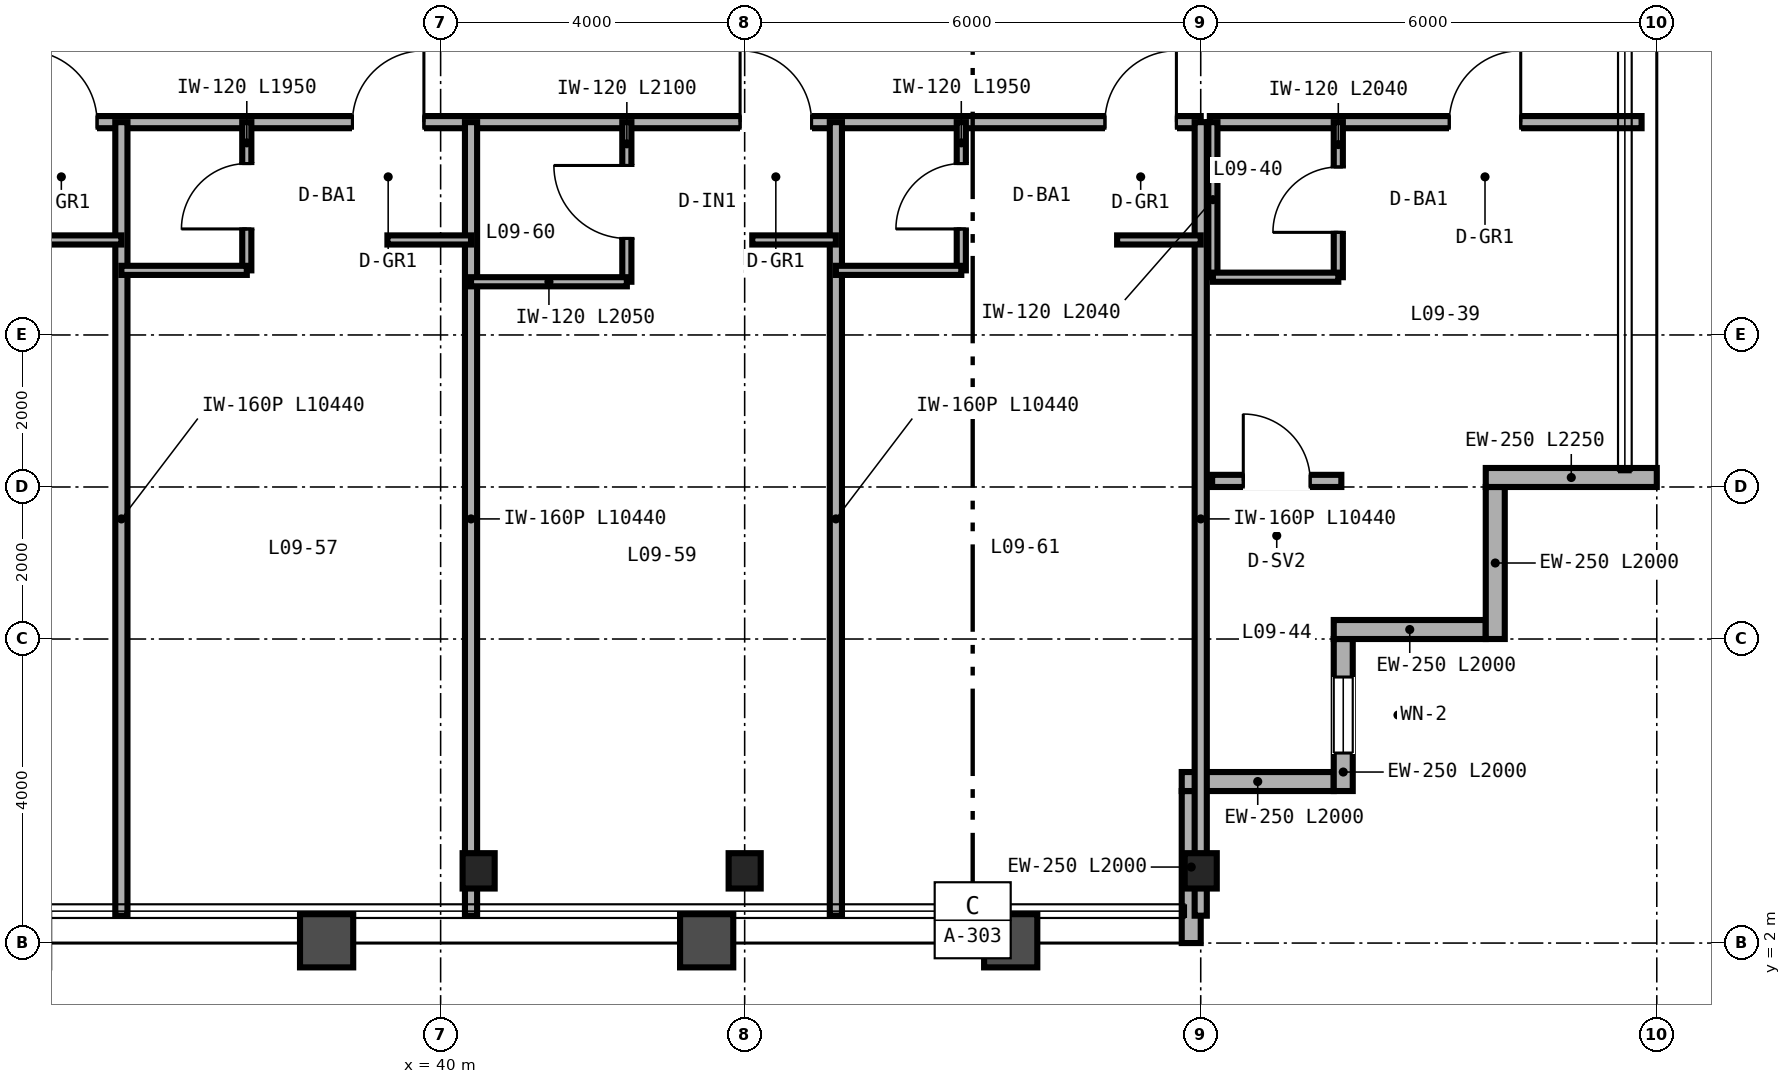
"""IFC4 building model, lengths in metres.
Left out: names, types, materials, properties, quantities, classifications, styles, units other than length and angle.
Written with IfcOpenShell. Run it as: python <this file> out.ifc"""

import sys

from ifc_helpers import new_model, si_unit, direction, frame, frame_2d, origin, origin_2d, place, context, subcontext, project, spatial, rectangle, i_section, extrude, source, transform, mapped, element, fill, save


model = new_model("IFC4")
c1 = context("Model", 3, precision=1e-05, world=origin(), true_north=direction((0.0, 1.0)))
c2 = subcontext(c1, "Body", "Model", "MODEL_VIEW")
j1 = project(units=[si_unit("LENGTHUNIT", "METRE"), si_unit("PLANEANGLEUNIT", "RADIAN")], contexts=[c1])
p1 = place(None, origin())
s1 = spatial("IfcSite", under=j1, at=p1, CompositionType="ELEMENT")
p2 = place(p1, origin())
s2 = spatial("IfcBuilding", under=s1, at=p2, CompositionType="ELEMENT")
p3 = place(p2, frame((0.0, 0.0, 42.0)))
s3 = spatial("IfcBuildingStorey", under=s2, at=p3, CompositionType="ELEMENT", Elevation=42.0)
m1 = source(origin(), c2, "Body", "SweptSolid", [
    extrude(i_section(OverallWidth=0.422, OverallDepth=0.465, WebThickness=0.045, FlangeThickness=0.073, FilletRadius=0.025, at=origin_2d()), origin(), (0.0, 0.0, 1.0), 3.35),
])
for number, where, z_axis, x_axis in (
    (1, (40.5, 2.95, 0.0), (0.0, 0.0, 1.0), (1.0, 0.0, 0.0)),
    (2, (44.0, 2.95, 0.0), (0.0, 0.0, 1.0), (1.0, 0.0, 0.0)),
    (3, (50.0, 2.95, 0.0), (0.0, 0.0, 1.0), (1.0, 0.0, 0.0)),
):
    element("IfcColumn", number, at=place(p3, frame(where, z_axis=z_axis, x_axis=x_axis)), inside=s3, PredefinedType="COLUMN", context=c2, shape_type="MappedRepresentation", body=[
        mapped(m1, transform((0.0, 0.0, 0.0), scale=1.0)),
    ])
p4 = place(p3, frame((49.875, 2.0, 0.0), z_axis=(0.0, 0.0, 1.0), x_axis=(0.0, 1.0, 0.0)))
e4 = element("IfcWall", 4, at=p4, inside=s3, PredefinedType="SOLIDWALL", context=c2, shape_type="SweptSolid", body=[
    extrude(rectangle(XDim=2.0, YDim=0.25, at=frame_2d((1.0, 0.0))), origin(), (0.0, 0.0, 1.0), 2.657),
])
p5 = place(p3, frame((49.75, 4.125, 0.0), z_axis=(0.0, 0.0, 1.0), x_axis=(1.0, 0.0, 0.0)))
e5 = element("IfcWall", 5, at=p5, inside=s3, PredefinedType="SOLIDWALL", context=c2, shape_type="SweptSolid", body=[
    extrude(rectangle(XDim=2.0, YDim=0.25, at=frame_2d((1.0, 0.0))), origin(), (0.0, 0.0, 1.0), 3.35),
])
p6 = place(p3, frame((51.875, 4.0, 0.0), z_axis=(0.0, 0.0, 1.0), x_axis=(0.0, 1.0, 0.0)))
e6 = element("IfcWall", 6, at=p6, inside=s3, PredefinedType="SOLIDWALL", context=c2, shape_type="SweptSolid", body=[
    extrude(rectangle(XDim=2.0, YDim=0.25, at=frame_2d((1.0, 0.0))), origin(), (0.0, 0.0, 1.0), 3.35),
])
p7 = place(p6, frame((0.5, 0.0, 0.85)))
e7 = element("IfcOpeningElement", 7, at=p7, cuts=e6, PredefinedType="OPENING", context=c2, shape_type="SweptSolid", body=[
    extrude(rectangle(XDim=1.0, YDim=1.9, at=frame_2d((0.5, 0.95))), frame((0.0, 0.135, 0.0), z_axis=(0.0, -1.0, 0.0), x_axis=(1.0, 0.0, 0.0)), (0.0, 0.0, 1.0), 0.27),
])
for number, where, z_axis, x_axis in (
    (8, (51.75, 6.125, 0.0), (0.0, 0.0, 1.0), (1.0, 0.0, 0.0)),
    (9, (53.875, 6.0, 0.0), (0.0, 0.0, 1.0), (0.0, 1.0, 0.0)),
):
    element("IfcWall", number, at=place(p3, frame(where, z_axis=z_axis, x_axis=x_axis)), inside=s3, PredefinedType="SOLIDWALL", context=c2, shape_type="SweptSolid", body=[
        extrude(rectangle(XDim=2.0, YDim=0.25, at=frame_2d((1.0, 0.0))), origin(), (0.0, 0.0, 1.0), 3.35),
    ])
p8 = place(p3, frame((53.75, 8.125, 0.0), z_axis=(0.0, 0.0, 1.0), x_axis=(1.0, 0.0, 0.0)))
e10 = element("IfcWall", 10, at=p8, inside=s3, PredefinedType="SOLIDWALL", context=c2, shape_type="SweptSolid", body=[
    extrude(rectangle(XDim=2.25, YDim=0.25, at=frame_2d((1.125, 0.0))), origin(), (0.0, 0.0, 1.0), 3.35),
])
p9 = place(p3, frame((50.12, 12.8, 0.0), z_axis=(0.0, 0.0, 1.0), x_axis=(1.0, 0.0, 0.0)))
e11 = element("IfcWall", 11, at=p9, inside=s3, PredefinedType="PARTITIONING", context=c2, shape_type="SweptSolid", body=[
    extrude(rectangle(XDim=5.68, YDim=0.16, at=frame_2d((2.84, 0.0))), origin(), (0.0, 0.0, 1.0), 3.35),
])
p10 = place(p9, frame((3.15, 0.0, 0.0)))
e12 = element("IfcOpeningElement", 12, at=p10, cuts=e11, PredefinedType="OPENING", context=c2, shape_type="SweptSolid", body=[
    extrude(rectangle(XDim=0.94, YDim=2.15, at=frame_2d((0.47, 1.075))), frame((0.0, 0.09, 0.0), z_axis=(0.0, -1.0, 0.0), x_axis=(1.0, 0.0, 0.0)), (0.0, 0.0, 1.0), 0.18),
])
p11 = place(p3, frame((51.81, 10.76, 0.0), z_axis=(0.0, 0.0, 1.0), x_axis=(0.0, 1.0, 0.0)))
e13 = element("IfcWall", 13, at=p11, inside=s3, PredefinedType="PARTITIONING", context=c2, shape_type="SweptSolid", body=[
    extrude(rectangle(XDim=2.04, YDim=0.12, at=frame_2d((1.02, 0.0))), origin(), (0.0, 0.0, 1.0), 3.35),
])
p12 = place(p11, frame((0.59, 0.0, 0.0)))
e14 = element("IfcOpeningElement", 14, at=p12, cuts=e13, PredefinedType="OPENING", context=c2, shape_type="SweptSolid", body=[
    extrude(rectangle(XDim=0.86, YDim=2.1, at=frame_2d((0.43, 1.05))), frame((0.0, 0.07, 0.0), z_axis=(0.0, -1.0, 0.0), x_axis=(1.0, 0.0, 0.0)), (0.0, 0.0, 1.0), 0.14),
])
p13 = place(p3, frame((50.16, 10.76, 0.0), z_axis=(0.0, 0.0, 1.0), x_axis=(0.0, 1.0, 0.0)))
e15 = element("IfcWall", 15, at=p13, inside=s3, PredefinedType="PARTITIONING", context=c2, shape_type="SweptSolid", body=[
    extrude(rectangle(XDim=2.04, YDim=0.12, at=frame_2d((1.02, 0.0))), origin(), (0.0, 0.0, 1.0), 3.35),
])
p14 = place(p3, frame((50.16, 10.76, 0.0), z_axis=(0.0, 0.0, 1.0), x_axis=(1.0, 0.0, 0.0)))
e16 = element("IfcWall", 16, at=p14, inside=s3, PredefinedType="PARTITIONING", context=c2, shape_type="SweptSolid", body=[
    extrude(rectangle(XDim=1.65, YDim=0.12, at=frame_2d((0.825, 0.0))), origin(), (0.0, 0.0, 1.0), 3.35),
])
p15 = place(p3, frame((50.15, 8.08, 0.0), z_axis=(0.0, 0.0, 1.0), x_axis=(1.0, 0.0, 0.0)))
e17 = element("IfcWall", 17, at=p15, inside=s3, PredefinedType="PARTITIONING", context=c2, shape_type="SweptSolid", body=[
    extrude(rectangle(XDim=1.7, YDim=0.16, at=frame_2d((0.85, 0.0))), origin(), (0.0, 0.0, 1.0), 3.35),
])
p16 = place(p15, frame((0.41, 0.0, 0.0)))
e18 = element("IfcOpeningElement", 18, at=p16, cuts=e17, PredefinedType="OPENING", context=c2, shape_type="SweptSolid", body=[
    extrude(rectangle(XDim=0.88, YDim=2.15, at=frame_2d((0.44, 1.075))), frame((0.0, 0.09, 0.0), z_axis=(0.0, -1.0, 0.0), x_axis=(1.0, 0.0, 0.0)), (0.0, 0.0, 1.0), 0.18),
])
p17 = place(p3, frame((14.0, 12.8, 0.0), z_axis=(0.0, 0.0, 1.0), x_axis=(1.0, 0.0, 0.0)))
e19 = element("IfcWall", 19, at=p17, inside=s3, PredefinedType="PARTITIONING", context=c2, shape_type="SweptSolid", body=[
    extrude(rectangle(XDim=36.0, YDim=0.16, at=frame_2d((18.0, 0.0))), origin(), (0.0, 0.0, 1.0), 2.571),
])
p18 = place(p17, frame((2.94, 0.0, 0.0)))
e20 = element("IfcOpeningElement", 20, at=p18, cuts=e19, PredefinedType="OPENING", context=c2, shape_type="SweptSolid", body=[
    extrude(rectangle(XDim=0.94, YDim=2.15, at=frame_2d((0.47, 1.075))), frame((0.0, 0.09, 0.0), z_axis=(0.0, -1.0, 0.0), x_axis=(1.0, 0.0, 0.0)), (0.0, 0.0, 1.0), 0.18),
])
p19 = place(p17, frame((7.14, 0.0, 0.0)))
e21 = element("IfcOpeningElement", 21, at=p19, cuts=e19, PredefinedType="OPENING", context=c2, shape_type="SweptSolid", body=[
    extrude(rectangle(XDim=0.94, YDim=2.15, at=frame_2d((0.47, 1.075))), frame((0.0, 0.09, 0.0), z_axis=(0.0, -1.0, 0.0), x_axis=(1.0, 0.0, 0.0)), (0.0, 0.0, 1.0), 0.18),
])
p20 = place(p17, frame((11.54, 0.0, 0.0)))
e22 = element("IfcOpeningElement", 22, at=p20, cuts=e19, PredefinedType="OPENING", context=c2, shape_type="SweptSolid", body=[
    extrude(rectangle(XDim=0.94, YDim=2.15, at=frame_2d((0.47, 1.075))), frame((0.0, 0.09, 0.0), z_axis=(0.0, -1.0, 0.0), x_axis=(1.0, 0.0, 0.0)), (0.0, 0.0, 1.0), 0.18),
])
p21 = place(p17, frame((15.94, 0.0, 0.0)))
e23 = element("IfcOpeningElement", 23, at=p21, cuts=e19, PredefinedType="OPENING", context=c2, shape_type="SweptSolid", body=[
    extrude(rectangle(XDim=0.94, YDim=2.15, at=frame_2d((0.47, 1.075))), frame((0.0, 0.09, 0.0), z_axis=(0.0, -1.0, 0.0), x_axis=(1.0, 0.0, 0.0)), (0.0, 0.0, 1.0), 0.18),
])
p22 = place(p17, frame((20.54, 0.0, 0.0)))
e24 = element("IfcOpeningElement", 24, at=p22, cuts=e19, PredefinedType="OPENING", context=c2, shape_type="SweptSolid", body=[
    extrude(rectangle(XDim=0.94, YDim=2.15, at=frame_2d((0.47, 1.075))), frame((0.0, 0.09, 0.0), z_axis=(0.0, -1.0, 0.0), x_axis=(1.0, 0.0, 0.0)), (0.0, 0.0, 1.0), 0.18),
])
p23 = place(p17, frame((24.84, 0.0, 0.0)))
e25 = element("IfcOpeningElement", 25, at=p23, cuts=e19, PredefinedType="OPENING", context=c2, shape_type="SweptSolid", body=[
    extrude(rectangle(XDim=0.94, YDim=2.15, at=frame_2d((0.47, 1.075))), frame((0.0, 0.09, 0.0), z_axis=(0.0, -1.0, 0.0), x_axis=(1.0, 0.0, 0.0)), (0.0, 0.0, 1.0), 0.18),
])
p24 = place(p17, frame((29.94, 0.0, 0.0)))
e26 = element("IfcOpeningElement", 26, at=p24, cuts=e19, PredefinedType="OPENING", context=c2, shape_type="SweptSolid", body=[
    extrude(rectangle(XDim=0.94, YDim=2.15, at=frame_2d((0.47, 1.075))), frame((0.0, 0.09, 0.0), z_axis=(0.0, -1.0, 0.0), x_axis=(1.0, 0.0, 0.0)), (0.0, 0.0, 1.0), 0.18),
])
p25 = place(p17, frame((34.74, 0.0, 0.0)))
e27 = element("IfcOpeningElement", 27, at=p25, cuts=e19, PredefinedType="OPENING", context=c2, shape_type="SweptSolid", body=[
    extrude(rectangle(XDim=0.94, YDim=2.15, at=frame_2d((0.47, 1.075))), frame((0.0, 0.09, 0.0), z_axis=(0.0, -1.0, 0.0), x_axis=(1.0, 0.0, 0.0)), (0.0, 0.0, 1.0), 0.18),
])
p26 = place(p3, frame((50.0, 2.36, 0.0), z_axis=(0.0, 0.0, 1.0), x_axis=(0.0, 1.0, 0.0)))
e28 = element("IfcWall", 28, at=p26, inside=s3, PredefinedType="PARTITIONING", context=c2, shape_type="SweptSolid", body=[
    extrude(rectangle(XDim=10.44, YDim=0.16, at=frame_2d((5.22, 0.0))), origin(), (0.0, 0.0, 1.0), 2.657),
])
p27 = place(p3, frame((35.8, 2.36, 0.0), z_axis=(0.0, 0.0, 1.0), x_axis=(0.0, 1.0, 0.0)))
e29 = element("IfcWall", 29, at=p27, inside=s3, PredefinedType="PARTITIONING", context=c2, shape_type="SweptSolid", body=[
    extrude(rectangle(XDim=10.44, YDim=0.16, at=frame_2d((5.22, 0.0))), origin(), (0.0, 0.0, 1.0), 2.423),
])
p28 = place(p3, frame((34.7, 11.25, 0.0), z_axis=(0.0, 0.0, 1.0), x_axis=(1.0, 0.0, 0.0)))
e30 = element("IfcWall", 30, at=p28, inside=s3, PredefinedType="PARTITIONING", context=c2, shape_type="SweptSolid", body=[
    extrude(rectangle(XDim=1.1, YDim=0.12, at=frame_2d((0.55, 0.0))), origin(), (0.0, 0.0, 1.0), 3.35),
])
p29 = place(p3, frame((40.4, 2.36, 0.0), z_axis=(0.0, 0.0, 1.0), x_axis=(0.0, 1.0, 0.0)))
e31 = element("IfcWall", 31, at=p29, inside=s3, PredefinedType="PARTITIONING", context=c2, shape_type="SweptSolid", body=[
    extrude(rectangle(XDim=10.44, YDim=0.16, at=frame_2d((5.22, 0.0))), origin(), (0.0, 0.0, 1.0), 2.423),
])
p30 = place(p3, frame((37.45, 10.85, 0.0), z_axis=(0.0, 0.0, 1.0), x_axis=(0.0, 1.0, 0.0)))
e32 = element("IfcWall", 32, at=p30, inside=s3, PredefinedType="PARTITIONING", context=c2, shape_type="SweptSolid", body=[
    extrude(rectangle(XDim=1.95, YDim=0.12, at=frame_2d((0.975, 0.0))), origin(), (0.0, 0.0, 1.0), 3.35),
])
p31 = place(p30, frame((0.545, 0.0, 0.0)))
e33 = element("IfcOpeningElement", 33, at=p31, cuts=e32, PredefinedType="OPENING", context=c2, shape_type="SweptSolid", body=[
    extrude(rectangle(XDim=0.86, YDim=2.1, at=frame_2d((0.43, 1.05))), frame((0.0, 0.07, 0.0), z_axis=(0.0, -1.0, 0.0), x_axis=(1.0, 0.0, 0.0)), (0.0, 0.0, 1.0), 0.14),
])
p32 = place(p3, frame((35.8, 10.85, 0.0), z_axis=(0.0, 0.0, 1.0), x_axis=(1.0, 0.0, 0.0)))
e34 = element("IfcWall", 34, at=p32, inside=s3, PredefinedType="PARTITIONING", context=c2, shape_type="SweptSolid", body=[
    extrude(rectangle(XDim=1.65, YDim=0.12, at=frame_2d((0.825, 0.0))), origin(), (0.0, 0.0, 1.0), 3.35),
])
p33 = place(p3, frame((39.3, 11.25, 0.0), z_axis=(0.0, 0.0, 1.0), x_axis=(1.0, 0.0, 0.0)))
e35 = element("IfcWall", 35, at=p33, inside=s3, PredefinedType="PARTITIONING", context=c2, shape_type="SweptSolid", body=[
    extrude(rectangle(XDim=1.1, YDim=0.12, at=frame_2d((0.55, 0.0))), origin(), (0.0, 0.0, 1.0), 2.571),
])
p34 = place(p3, frame((45.2, 2.36, 0.0), z_axis=(0.0, 0.0, 1.0), x_axis=(0.0, 1.0, 0.0)))
e36 = element("IfcWall", 36, at=p34, inside=s3, PredefinedType="PARTITIONING", context=c2, shape_type="SweptSolid", body=[
    extrude(rectangle(XDim=10.44, YDim=0.16, at=frame_2d((5.22, 0.0))), origin(), (0.0, 0.0, 1.0), 2.657),
])
p35 = place(p3, frame((42.45, 10.7, 0.0), z_axis=(0.0, 0.0, 1.0), x_axis=(0.0, 1.0, 0.0)))
e37 = element("IfcWall", 37, at=p35, inside=s3, PredefinedType="PARTITIONING", context=c2, shape_type="SweptSolid", body=[
    extrude(rectangle(XDim=2.1, YDim=0.12, at=frame_2d((1.05, 0.0))), origin(), (0.0, 0.0, 1.0), 3.35),
])
p36 = place(p35, frame((0.57, 0.0, 0.0)))
e38 = element("IfcOpeningElement", 38, at=p36, cuts=e37, PredefinedType="OPENING", context=c2, shape_type="SweptSolid", body=[
    extrude(rectangle(XDim=0.96, YDim=2.15, at=frame_2d((0.48, 1.075))), frame((0.0, 0.07, 0.0), z_axis=(0.0, -1.0, 0.0), x_axis=(1.0, 0.0, 0.0)), (0.0, 0.0, 1.0), 0.14),
])
p37 = place(p3, frame((40.4, 10.7, 0.0), z_axis=(0.0, 0.0, 1.0), x_axis=(1.0, 0.0, 0.0)))
e39 = element("IfcWall", 39, at=p37, inside=s3, PredefinedType="PARTITIONING", context=c2, shape_type="SweptSolid", body=[
    extrude(rectangle(XDim=2.05, YDim=0.12, at=frame_2d((1.025, 0.0))), origin(), (0.0, 0.0, 1.0), 2.571),
])
p38 = place(p3, frame((44.1, 11.25, 0.0), z_axis=(0.0, 0.0, 1.0), x_axis=(1.0, 0.0, 0.0)))
e40 = element("IfcWall", 40, at=p38, inside=s3, PredefinedType="PARTITIONING", context=c2, shape_type="SweptSolid", body=[
    extrude(rectangle(XDim=1.1, YDim=0.12, at=frame_2d((0.55, 0.0))), origin(), (0.0, 0.0, 1.0), 3.35),
])
p39 = place(p3, frame((46.85, 10.85, 0.0), z_axis=(0.0, 0.0, 1.0), x_axis=(0.0, 1.0, 0.0)))
e41 = element("IfcWall", 41, at=p39, inside=s3, PredefinedType="PARTITIONING", context=c2, shape_type="SweptSolid", body=[
    extrude(rectangle(XDim=1.95, YDim=0.12, at=frame_2d((0.975, 0.0))), origin(), (0.0, 0.0, 1.0), 3.35),
])
p40 = place(p39, frame((0.545, 0.0, 0.0)))
e42 = element("IfcOpeningElement", 42, at=p40, cuts=e41, PredefinedType="OPENING", context=c2, shape_type="SweptSolid", body=[
    extrude(rectangle(XDim=0.86, YDim=2.1, at=frame_2d((0.43, 1.05))), frame((0.0, 0.07, 0.0), z_axis=(0.0, -1.0, 0.0), x_axis=(1.0, 0.0, 0.0)), (0.0, 0.0, 1.0), 0.14),
])
p41 = place(p3, frame((45.2, 10.85, 0.0), z_axis=(0.0, 0.0, 1.0), x_axis=(1.0, 0.0, 0.0)))
e43 = element("IfcWall", 43, at=p41, inside=s3, PredefinedType="PARTITIONING", context=c2, shape_type="SweptSolid", body=[
    extrude(rectangle(XDim=1.65, YDim=0.12, at=frame_2d((0.825, 0.0))), origin(), (0.0, 0.0, 1.0), 3.35),
])
p42 = place(p3, frame((48.9, 11.25, 0.0), z_axis=(0.0, 0.0, 1.0), x_axis=(1.0, 0.0, 0.0)))
e44 = element("IfcWall", 44, at=p42, inside=s3, PredefinedType="PARTITIONING", context=c2, shape_type="SweptSolid", body=[
    extrude(rectangle(XDim=1.1, YDim=0.12, at=frame_2d((0.55, 0.0))), origin(), (0.0, 0.0, 1.0), 3.35),
])
m2 = source(origin(), c2, "Body", "SweptSolid", [
    extrude(rectangle(XDim=1.0, YDim=1.9, at=frame_2d((0.5, 0.95))), frame((0.0, 0.03, 0.0), z_axis=(0.0, -1.0, 0.0), x_axis=(1.0, 0.0, 0.0)), (0.0, 0.0, 1.0), 0.06),
])
p43 = place(p7, origin())
e45 = element("IfcWindow", 45, at=p43, inside=s3, PartitioningType="SINGLE_PANEL", PredefinedType="WINDOW", context=c2, shape_type="MappedRepresentation", body=[
    mapped(m2, transform((0.0, 0.0, 0.0), scale=1.0)),
])
fill(e7, e45)
m3 = source(origin(), c2, "Body", "SweptSolid", [
    extrude(rectangle(XDim=0.86, YDim=2.1, at=frame_2d((0.43, 1.05))), frame((0.0, 0.025, 0.0), z_axis=(0.0, -1.0, 0.0), x_axis=(1.0, 0.0, 0.0)), (0.0, 0.0, 1.0), 0.05),
])
p44 = place(p12, origin())
e46 = element("IfcDoor", 46, at=p44, inside=s3, OperationType="SINGLE_SWING_LEFT", PredefinedType="DOOR", context=c2, shape_type="MappedRepresentation", body=[
    mapped(m3, transform((0.0, 0.0, 0.0), scale=1.0)),
])
fill(e14, e46)
m4 = source(origin(), c2, "Body", "SweptSolid", [
    extrude(rectangle(XDim=0.94, YDim=2.15, at=frame_2d((0.47, 1.075))), frame((0.0, 0.025, 0.0), z_axis=(0.0, -1.0, 0.0), x_axis=(1.0, 0.0, 0.0)), (0.0, 0.0, 1.0), 0.05),
])
p45 = place(p10, origin())
e47 = element("IfcDoor", 47, at=p45, inside=s3, OperationType="SINGLE_SWING_RIGHT", PredefinedType="DOOR", context=c2, shape_type="MappedRepresentation", body=[
    mapped(m4, transform((0.0, 0.0, 0.0), scale=1.0)),
])
fill(e12, e47)
m5 = source(origin(), c2, "Body", "SweptSolid", [
    extrude(rectangle(XDim=0.88, YDim=2.15, at=frame_2d((0.44, 1.075))), frame((0.0, 0.025, 0.0), z_axis=(0.0, -1.0, 0.0), x_axis=(1.0, 0.0, 0.0)), (0.0, 0.0, 1.0), 0.05),
])
p46 = place(p16, origin())
e48 = element("IfcDoor", 48, at=p46, inside=s3, OperationType="SINGLE_SWING_LEFT", PredefinedType="DOOR", context=c2, shape_type="MappedRepresentation", body=[
    mapped(m5, transform((0.0, 0.0, 0.0), scale=1.0)),
])
fill(e18, e48)
p47 = place(p31, origin())
e49 = element("IfcDoor", 49, at=p47, inside=s3, OperationType="SINGLE_SWING_LEFT", PredefinedType="DOOR", context=c2, shape_type="MappedRepresentation", body=[
    mapped(m3, transform((0.0, 0.0, 0.0), scale=1.0)),
])
fill(e33, e49)
m6 = source(origin(), c2, "Body", "SweptSolid", [
    extrude(rectangle(XDim=0.96, YDim=2.15, at=frame_2d((0.48, 1.075))), frame((0.0, 0.025, 0.0), z_axis=(0.0, -1.0, 0.0), x_axis=(1.0, 0.0, 0.0)), (0.0, 0.0, 1.0), 0.05),
])
p48 = place(p36, origin())
e50 = element("IfcDoor", 50, at=p48, inside=s3, OperationType="SINGLE_SWING_RIGHT", PredefinedType="DOOR", context=c2, shape_type="MappedRepresentation", body=[
    mapped(m6, transform((0.0, 0.0, 0.0), scale=1.0)),
])
fill(e38, e50)
p49 = place(p40, origin())
e51 = element("IfcDoor", 51, at=p49, inside=s3, OperationType="SINGLE_SWING_LEFT", PredefinedType="DOOR", context=c2, shape_type="MappedRepresentation", body=[
    mapped(m3, transform((0.0, 0.0, 0.0), scale=1.0)),
])
fill(e42, e51)
p50 = place(p22, origin())
e52 = element("IfcDoor", 52, at=p50, inside=s3, OperationType="SINGLE_SWING_LEFT", PredefinedType="DOOR", context=c2, shape_type="MappedRepresentation", body=[
    mapped(m4, transform((0.0, 0.0, 0.0), scale=1.0)),
])
fill(e24, e52)
p51 = place(p23, origin())
e53 = element("IfcDoor", 53, at=p51, inside=s3, OperationType="SINGLE_SWING_RIGHT", PredefinedType="DOOR", context=c2, shape_type="MappedRepresentation", body=[
    mapped(m4, transform((0.0, 0.0, 0.0), scale=1.0)),
])
fill(e25, e53)
p52 = place(p24, origin())
e54 = element("IfcDoor", 54, at=p52, inside=s3, OperationType="SINGLE_SWING_LEFT", PredefinedType="DOOR", context=c2, shape_type="MappedRepresentation", body=[
    mapped(m4, transform((0.0, 0.0, 0.0), scale=1.0)),
])
fill(e26, e54)
p53 = place(p25, origin())
e55 = element("IfcDoor", 55, at=p53, inside=s3, OperationType="SINGLE_SWING_RIGHT", PredefinedType="DOOR", context=c2, shape_type="MappedRepresentation", body=[
    mapped(m4, transform((0.0, 0.0, 0.0), scale=1.0)),
])
fill(e27, e55)
save(model, sys.argv[1])
